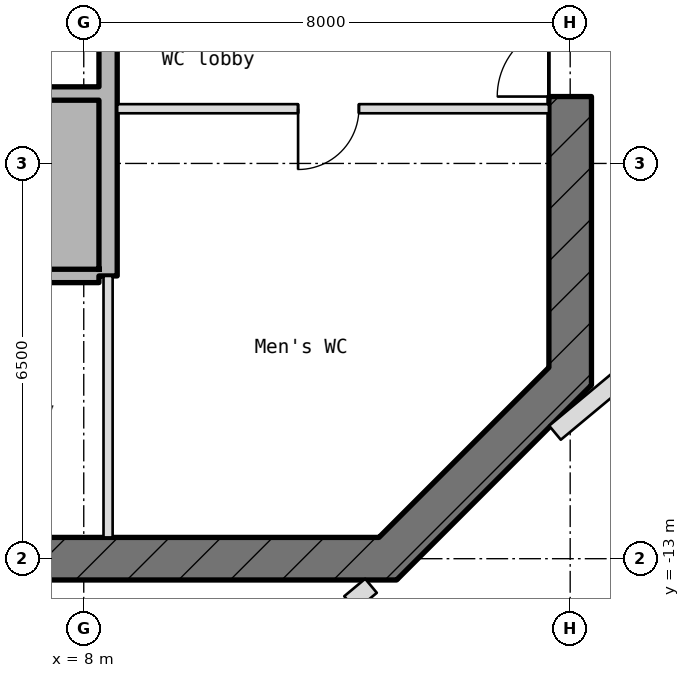
"""IFC4 building model, lengths in metres.
Left out: names, types, materials, properties, quantities, classifications, styles, units other than length and angle.
Written with IfcOpenShell. Run it as: python <this file> out.ifc"""

import sys

from ifc_helpers import new_model, si_unit, direction, frame, frame_2d, origin, place, context, subcontext, project, spatial, rectangle, extrude, element, fill, save


model = new_model("IFC4")
c1 = context("Model", 3, precision=1e-05, world=origin(), true_north=direction((0.0, 1.0)))
c2 = subcontext(c1, "Body", "Model", "MODEL_VIEW")
j1 = project(units=[si_unit("LENGTHUNIT", "METRE"), si_unit("PLANEANGLEUNIT", "RADIAN")], contexts=[c1])
p1 = place(None, origin())
s1 = spatial("IfcSite", under=j1, at=p1, CompositionType="ELEMENT")
p2 = place(p1, origin())
s2 = spatial("IfcBuilding", under=s1, at=p2, CompositionType="ELEMENT")
p3 = place(p2, frame((0.0, 0.0, 407.55)))
s3 = spatial("IfcBuildingStorey", under=s2, at=p3, CompositionType="ELEMENT", Elevation=407.55)
p4 = place(p3, frame((12.897, -13.103, -0.3), z_axis=(0.0, 0.0, 1.0), x_axis=(0.707106781187, 0.707106781187, 0.0)))
e1 = element("IfcWall", 1, at=p4, inside=s3, PredefinedType="SHEAR", context=c2, shape_type="SweptSolid", body=[
    extrude(rectangle(XDim=4.533, YDim=0.7, at=frame_2d((2.266, 0.0))), origin(), (0.0, 0.0, 1.0), 6.1),
])
p5 = place(p3, frame((16.0, -10.145, -0.3), z_axis=(0.0, 0.0, 1.0), x_axis=(0.0, 1.0, 0.0)))
e2 = element("IfcWall", 2, at=p5, inside=s3, PredefinedType="SHEAR", context=c2, shape_type="SweptSolid", body=[
    extrude(rectangle(XDim=20.29, YDim=0.7, at=frame_2d((10.145, 0.0))), origin(), (0.0, 0.0, 1.0), 6.1),
])
p6 = place(p5, frame((8.945, 0.0, 0.3)))
e3 = element("IfcOpeningElement", 3, at=p6, cuts=e2, PredefinedType="OPENING", context=c2, shape_type="SweptSolid", body=[
    extrude(rectangle(XDim=2.4, YDim=2.1, at=frame_2d((1.2, 1.05))), frame((0.0, 0.36, 0.0), z_axis=(0.0, -1.0, 0.0), x_axis=(1.0, 0.0, 0.0)), (0.0, 0.0, 1.0), 0.72),
])
p7 = place(p5, frame((13.545, 0.0, 0.3)))
e4 = element("IfcOpeningElement", 4, at=p7, cuts=e2, PredefinedType="OPENING", context=c2, shape_type="SweptSolid", body=[
    extrude(rectangle(XDim=1.2, YDim=2.1, at=frame_2d((0.6, 1.05))), frame((0.0, 0.36, 0.0), z_axis=(0.0, -1.0, 0.0), x_axis=(1.0, 0.0, 0.0)), (0.0, 0.0, 1.0), 0.72),
])
p8 = place(p5, frame((4.745, 0.0, 0.3)))
e5 = element("IfcOpeningElement", 5, at=p8, cuts=e2, PredefinedType="OPENING", context=c2, shape_type="SweptSolid", body=[
    extrude(rectangle(XDim=1.2, YDim=2.1, at=frame_2d((0.6, 1.05))), frame((0.0, 0.36, 0.0), z_axis=(0.0, -1.0, 0.0), x_axis=(1.0, 0.0, 0.0)), (0.0, 0.0, 1.0), 0.72),
])
p9 = place(p3, frame((-13.145, -13.0, -0.3), z_axis=(0.0, 0.0, 1.0), x_axis=(1.0, 0.0, 0.0)))
e6 = element("IfcWall", 6, at=p9, inside=s3, PredefinedType="SHEAR", context=c2, shape_type="SweptSolid", body=[
    extrude(rectangle(XDim=26.29, YDim=0.7, at=frame_2d((13.145, 0.0))), origin(), (0.0, 0.0, 1.0), 6.1),
])
p10 = place(p9, frame((2.845, 0.0, 0.3)))
e7 = element("IfcOpeningElement", 7, at=p10, cuts=e6, PredefinedType="OPENING", context=c2, shape_type="SweptSolid", body=[
    extrude(rectangle(XDim=1.2, YDim=2.1, at=frame_2d((0.6, 1.05))), frame((0.0, 0.36, 0.0), z_axis=(0.0, -1.0, 0.0), x_axis=(1.0, 0.0, 0.0)), (0.0, 0.0, 1.0), 0.72),
])
p11 = place(p9, frame((6.845, 0.0, 0.3)))
e8 = element("IfcOpeningElement", 8, at=p11, cuts=e6, PredefinedType="OPENING", context=c2, shape_type="SweptSolid", body=[
    extrude(rectangle(XDim=1.4, YDim=2.1, at=frame_2d((0.7, 1.05))), frame((0.0, 0.36, 0.0), z_axis=(0.0, -1.0, 0.0), x_axis=(1.0, 0.0, 0.0)), (0.0, 0.0, 1.0), 0.72),
])
p12 = place(p9, frame((15.445, 0.0, 0.3)))
e9 = element("IfcOpeningElement", 9, at=p12, cuts=e6, PredefinedType="OPENING", context=c2, shape_type="SweptSolid", body=[
    extrude(rectangle(XDim=1.4, YDim=2.1, at=frame_2d((0.7, 1.05))), frame((0.0, 0.36, 0.0), z_axis=(0.0, -1.0, 0.0), x_axis=(1.0, 0.0, 0.0)), (0.0, 0.0, 1.0), 0.72),
])
p13 = place(p3, frame((-2.69, -8.35, 0.0), z_axis=(0.0, 0.0, 1.0), x_axis=(1.0, 0.0, 0.0)))
e10 = element("IfcWall", 10, at=p13, inside=s3, PredefinedType="STANDARD", context=c2, shape_type="SweptSolid", body=[
    extrude(rectangle(XDim=10.94, YDim=0.22, at=frame_2d((5.47, 0.0))), origin(), (0.0, 0.0, 1.0), 5.8),
])
p14 = place(p13, frame((0.74, 0.0, 0.0)))
e11 = element("IfcOpeningElement", 11, at=p14, cuts=e10, PredefinedType="OPENING", context=c2, shape_type="SweptSolid", body=[
    extrude(rectangle(XDim=1.1, YDim=2.1, at=frame_2d((0.55, 1.05))), frame((0.0, 0.12, 0.0), z_axis=(0.0, -1.0, 0.0), x_axis=(1.0, 0.0, 0.0)), (0.0, 0.0, 1.0), 0.24),
])
p15 = place(p13, frame((3.54, 0.0, 0.0)))
e12 = element("IfcOpeningElement", 12, at=p15, cuts=e10, PredefinedType="OPENING", context=c2, shape_type="SweptSolid", body=[
    extrude(rectangle(XDim=1.1, YDim=2.1, at=frame_2d((0.55, 1.05))), frame((0.0, 0.12, 0.0), z_axis=(0.0, -1.0, 0.0), x_axis=(1.0, 0.0, 0.0)), (0.0, 0.0, 1.0), 0.24),
])
p16 = place(p3, frame((8.55, -5.6, 0.0), z_axis=(0.0, 0.0, 1.0), x_axis=(1.0, 0.0, 0.0)))
e13 = element("IfcWall", 13, at=p16, inside=s3, PredefinedType="PARTITIONING", context=c2, shape_type="SweptSolid", body=[
    extrude(rectangle(XDim=7.1, YDim=0.15, at=frame_2d((3.55, 0.0))), origin(), (0.0, 0.0, 1.0), 5.8),
])
p17 = place(p16, frame((2.975, 0.0, 0.0)))
e14 = element("IfcOpeningElement", 14, at=p17, cuts=e13, PredefinedType="OPENING", context=c2, shape_type="SweptSolid", body=[
    extrude(rectangle(XDim=1.0, YDim=2.1, at=frame_2d((0.5, 1.05))), frame((0.0, 0.085, 0.0), z_axis=(0.0, -1.0, 0.0), x_axis=(1.0, 0.0, 0.0)), (0.0, 0.0, 1.0), 0.17),
])
p18 = place(p3, frame((-8.25, -5.35, 0.0), z_axis=(0.0, 0.0, 1.0), x_axis=(1.0, 0.0, 0.0)))
e15 = element("IfcWall", 15, at=p18, inside=s3, PredefinedType="STANDARD", context=c2, shape_type="SweptSolid", body=[
    extrude(rectangle(XDim=16.5, YDim=0.22, at=frame_2d((8.25, 0.0))), origin(), (0.0, 0.0, 1.0), 5.8),
])
p19 = place(p3, frame((8.4, -12.65, 0.0), z_axis=(0.0, 0.0, 1.0), x_axis=(0.0, 1.0, 0.0)))
e16 = element("IfcWall", 16, at=p19, inside=s3, PredefinedType="PARTITIONING", context=c2, shape_type="SweptSolid", body=[
    extrude(rectangle(XDim=4.3, YDim=0.15, at=frame_2d((2.15, 0.0))), origin(), (0.0, 0.0, 1.0), 5.8),
])
p20 = place(p3, frame((8.4, -8.35, -0.3), z_axis=(0.0, 0.0, 1.0), x_axis=(0.0, 1.0, 0.0)))
e17 = element("IfcWall", 17, at=p20, inside=s3, PredefinedType="SHEAR", context=c2, shape_type="SweptSolid", body=[
    extrude(rectangle(XDim=5.85, YDim=0.3, at=frame_2d((2.925, 0.0))), origin(), (0.0, 0.0, 1.0), 6.1),
])
p21 = place(p3, frame((12.38, -13.732, 0.0), z_axis=(0.0, 0.0, 1.0), x_axis=(0.768489258739, 0.639862687772, 0.0)))
e18 = element("IfcWall", 18, at=p21, inside=s3, PredefinedType="STANDARD", context=c2, shape_type="SweptSolid", body=[
    extrude(rectangle(XDim=0.448, YDim=0.3, at=frame_2d((0.224, 0.0))), origin(), (0.0, 0.0, 1.0), 5.8),
])
p22 = place(p3, frame((15.75, -10.928, 0.0), z_axis=(0.0, 0.0, 1.0), x_axis=(0.768724548227, 0.639579994178, 0.0)))
e19 = element("IfcWall", 19, at=p22, inside=s3, PredefinedType="STANDARD", context=c2, shape_type="SweptSolid", body=[
    extrude(rectangle(XDim=1.669, YDim=0.3, at=frame_2d((0.834, 0.0))), origin(), (0.0, 0.0, 1.0), 5.8),
])
p23 = place(p8, origin())
e20 = element("IfcDoor", 20, at=p23, inside=s3, OperationType="SINGLE_SWING_RIGHT", PredefinedType="DOOR", context=c2, shape_type="SweptSolid", body=[
    extrude(rectangle(XDim=1.2, YDim=2.1, at=frame_2d((0.6, 1.05))), frame((0.0, 0.025, 0.0), z_axis=(0.0, -1.0, 0.0), x_axis=(1.0, 0.0, 0.0)), (0.0, 0.0, 1.0), 0.05),
])
fill(e5, e20)
p24 = place(p17, frame((1.0, 0.0, 0.0), z_axis=(0.0, 0.0, 1.0), x_axis=(-1.0, 0.0, 0.0)))
e21 = element("IfcDoor", 21, at=p24, inside=s3, OperationType="SINGLE_SWING_LEFT", PredefinedType="DOOR", context=c2, shape_type="SweptSolid", body=[
    extrude(rectangle(XDim=1.0, YDim=2.1, at=frame_2d((0.5, 1.05))), frame((0.0, 0.025, 0.0), z_axis=(0.0, -1.0, 0.0), x_axis=(1.0, 0.0, 0.0)), (0.0, 0.0, 1.0), 0.05),
])
fill(e14, e21)
save(model, sys.argv[1])
